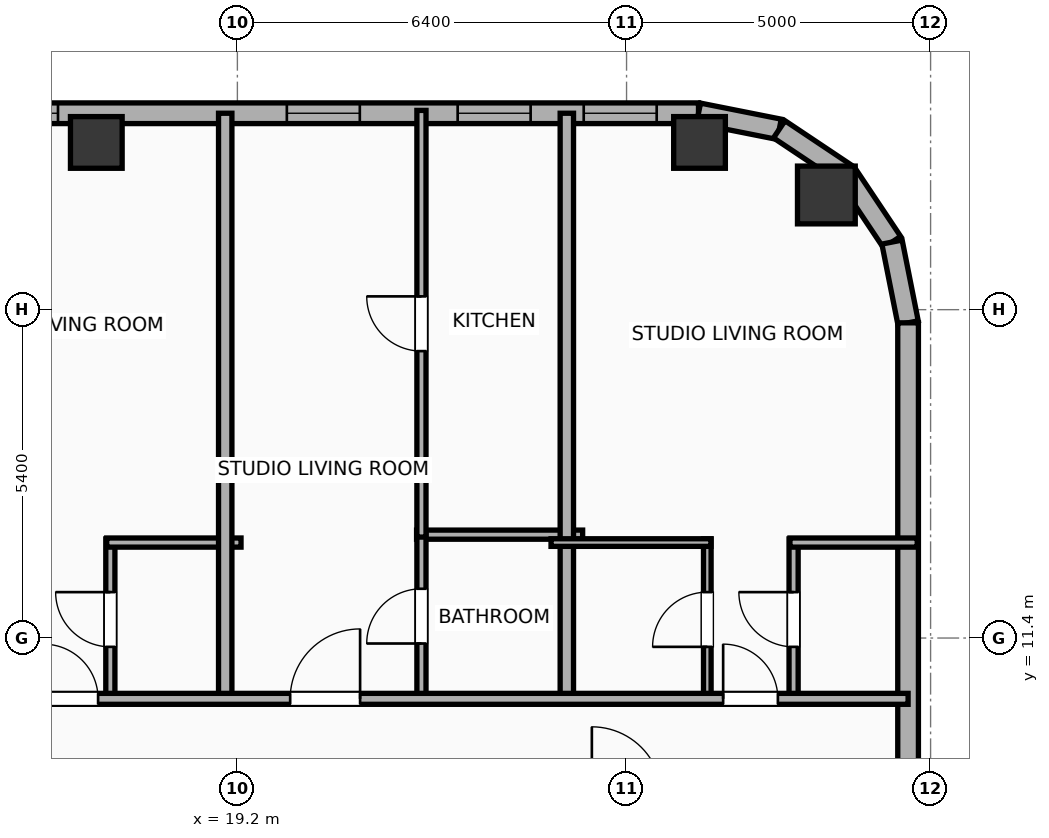
"""IFC4 building model, lengths in metres.
Left out: names, types, materials, properties, quantities, classifications, styles, units other than length and angle.
Written with IfcOpenShell. Run it as: python <this file> out.ifc"""

import sys

from ifc_helpers import new_model, si_unit, direction, frame, frame_2d, origin, origin_2d, place, context, subcontext, project, spatial, rectangle, hollow_rectangle, hollow_circle, extrude, element, fill, save


model = new_model("IFC4")
c1 = context("Model", 3, precision=1e-05, world=origin(), true_north=direction((0.0, 1.0)))
c2 = subcontext(c1, "Body", "Model", "MODEL_VIEW")
j1 = project(units=[si_unit("LENGTHUNIT", "METRE"), si_unit("PLANEANGLEUNIT", "RADIAN")], contexts=[c1])
p1 = place(None, origin())
s1 = spatial("IfcSite", under=j1, at=p1, CompositionType="ELEMENT")
p2 = place(p1, origin())
s2 = spatial("IfcBuilding", under=s1, at=p2, CompositionType="ELEMENT")
p3 = place(p2, frame((0.0, 0.0, 208.0)))
s3 = spatial("IfcBuildingStorey", under=s2, at=p3, CompositionType="ELEMENT", Elevation=208.0)
p4 = place(p3, frame((28.886, 18.686, 0.0), z_axis=(0.0, 0.0, 1.0), x_axis=(1.0, 0.0, 0.0)))
e1 = element("IfcColumn", 1, at=p4, inside=s3, PredefinedType="COLUMN", context=c2, shape_type="SweptSolid", body=[
    extrude(hollow_circle(Radius=0.475, WallThickness=0.032, at=origin_2d()), origin(), (0.0, 0.0, 1.0), 3.9),
])
for number, where, z_axis, x_axis in (
    (2, (26.8, 19.55, 0.0), (0.0, 0.0, 1.0), (1.0, 0.0, 0.0)),
    (3, (16.88, 19.55, 0.0), (0.0, 0.0, 1.0), (1.0, 0.0, 0.0)),
):
    element("IfcColumn", number, at=place(p3, frame(where, z_axis=z_axis, x_axis=x_axis)), inside=s3, PredefinedType="COLUMN", context=c2, shape_type="SweptSolid", body=[
        extrude(hollow_rectangle(XDim=0.85, YDim=0.85, WallThickness=0.028, at=origin_2d()), origin(), (0.0, 0.0, 1.0), 3.9),
    ])
p5 = place(p3, frame((-22.783, 20.03, 0.0), z_axis=(0.0, 0.0, 1.0), x_axis=(1.0, 0.0, 0.0)))
e4 = element("IfcWall", 4, at=p5, inside=s3, PredefinedType="ELEMENTEDWALL", context=c2, shape_type="SweptSolid", body=[
    extrude(rectangle(XDim=49.566, YDim=0.34, at=frame_2d((24.783, 0.0))), origin(), (0.0, 0.0, 1.0), 3.65),
])
p6 = place(p5, frame((25.233, 0.0, 0.75)))
e5 = element("IfcOpeningElement", 5, at=p6, cuts=e4, PredefinedType="OPENING", context=c2, shape_type="SweptSolid", body=[
    extrude(rectangle(XDim=2.4, YDim=2.1, at=frame_2d((1.2, 1.05))), frame((0.0, 0.18, 0.0), z_axis=(0.0, -1.0, 0.0), x_axis=(1.0, 0.0, 0.0)), (0.0, 0.0, 1.0), 0.36),
])
p7 = place(p5, frame((1.532, 0.0, 0.75)))
e6 = element("IfcOpeningElement", 6, at=p7, cuts=e4, PredefinedType="OPENING", context=c2, shape_type="SweptSolid", body=[
    extrude(rectangle(XDim=1.2, YDim=2.05, at=frame_2d((0.6, 1.025))), frame((0.0, 0.18, 0.0), z_axis=(0.0, -1.0, 0.0), x_axis=(1.0, 0.0, 0.0)), (0.0, 0.0, 1.0), 0.36),
])
p8 = place(p5, frame((4.478, 0.0, 0.75)))
e7 = element("IfcOpeningElement", 7, at=p8, cuts=e4, PredefinedType="OPENING", context=c2, shape_type="SweptSolid", body=[
    extrude(rectangle(XDim=1.2, YDim=2.05, at=frame_2d((0.6, 1.025))), frame((0.0, 0.18, 0.0), z_axis=(0.0, -1.0, 0.0), x_axis=(1.0, 0.0, 0.0)), (0.0, 0.0, 1.0), 0.36),
])
p9 = place(p5, frame((7.983, 0.0, 0.75)))
e8 = element("IfcOpeningElement", 8, at=p9, cuts=e4, PredefinedType="OPENING", context=c2, shape_type="SweptSolid", body=[
    extrude(rectangle(XDim=1.2, YDim=2.05, at=frame_2d((0.6, 1.025))), frame((0.0, 0.18, 0.0), z_axis=(0.0, -1.0, 0.0), x_axis=(1.0, 0.0, 0.0)), (0.0, 0.0, 1.0), 0.36),
])
p10 = place(p5, frame((16.46, 0.0, 0.75)))
e9 = element("IfcOpeningElement", 9, at=p10, cuts=e4, PredefinedType="OPENING", context=c2, shape_type="SweptSolid", body=[
    extrude(rectangle(XDim=1.2, YDim=2.05, at=frame_2d((0.6, 1.025))), frame((0.0, 0.18, 0.0), z_axis=(0.0, -1.0, 0.0), x_axis=(1.0, 0.0, 0.0)), (0.0, 0.0, 1.0), 0.36),
])
p11 = place(p5, frame((13.46, 0.0, 0.75)))
e10 = element("IfcOpeningElement", 10, at=p11, cuts=e4, PredefinedType="OPENING", context=c2, shape_type="SweptSolid", body=[
    extrude(rectangle(XDim=1.2, YDim=2.05, at=frame_2d((0.6, 1.025))), frame((0.0, 0.18, 0.0), z_axis=(0.0, -1.0, 0.0), x_axis=(1.0, 0.0, 0.0)), (0.0, 0.0, 1.0), 0.36),
])
p12 = place(p5, frame((21.183, 0.0, 0.75)))
e11 = element("IfcOpeningElement", 11, at=p12, cuts=e4, PredefinedType="OPENING", context=c2, shape_type="SweptSolid", body=[
    extrude(rectangle(XDim=1.2, YDim=2.05, at=frame_2d((0.6, 1.025))), frame((0.0, 0.18, 0.0), z_axis=(0.0, -1.0, 0.0), x_axis=(1.0, 0.0, 0.0)), (0.0, 0.0, 1.0), 0.36),
])
p13 = place(p5, frame((31.808, 0.0, 0.75)))
e12 = element("IfcOpeningElement", 12, at=p13, cuts=e4, PredefinedType="OPENING", context=c2, shape_type="SweptSolid", body=[
    extrude(rectangle(XDim=1.2, YDim=2.05, at=frame_2d((0.6, 1.025))), frame((0.0, 0.18, 0.0), z_axis=(0.0, -1.0, 0.0), x_axis=(1.0, 0.0, 0.0)), (0.0, 0.0, 1.0), 0.36),
])
p14 = place(p5, frame((34.558, 0.0, 0.75)))
e13 = element("IfcOpeningElement", 13, at=p14, cuts=e4, PredefinedType="OPENING", context=c2, shape_type="SweptSolid", body=[
    extrude(rectangle(XDim=1.2, YDim=2.05, at=frame_2d((0.6, 1.025))), frame((0.0, 0.18, 0.0), z_axis=(0.0, -1.0, 0.0), x_axis=(1.0, 0.0, 0.0)), (0.0, 0.0, 1.0), 0.36),
])
p15 = place(p5, frame((37.833, 0.0, 0.75)))
e14 = element("IfcOpeningElement", 14, at=p15, cuts=e4, PredefinedType="OPENING", context=c2, shape_type="SweptSolid", body=[
    extrude(rectangle(XDim=1.2, YDim=2.05, at=frame_2d((0.6, 1.025))), frame((0.0, 0.18, 0.0), z_axis=(0.0, -1.0, 0.0), x_axis=(1.0, 0.0, 0.0)), (0.0, 0.0, 1.0), 0.36),
])
p16 = place(p5, frame((42.797, 0.0, 0.75)))
e15 = element("IfcOpeningElement", 15, at=p16, cuts=e4, PredefinedType="OPENING", context=c2, shape_type="SweptSolid", body=[
    extrude(rectangle(XDim=1.2, YDim=2.05, at=frame_2d((0.6, 1.025))), frame((0.0, 0.18, 0.0), z_axis=(0.0, -1.0, 0.0), x_axis=(1.0, 0.0, 0.0)), (0.0, 0.0, 1.0), 0.36),
])
p17 = place(p5, frame((45.606, 0.0, 0.75)))
e16 = element("IfcOpeningElement", 16, at=p17, cuts=e4, PredefinedType="OPENING", context=c2, shape_type="SweptSolid", body=[
    extrude(rectangle(XDim=1.2, YDim=2.05, at=frame_2d((0.6, 1.025))), frame((0.0, 0.18, 0.0), z_axis=(0.0, -1.0, 0.0), x_axis=(1.0, 0.0, 0.0)), (0.0, 0.0, 1.0), 0.36),
])
p18 = place(p5, frame((47.679, 0.0, 0.75)))
e17 = element("IfcOpeningElement", 17, at=p18, cuts=e4, PredefinedType="OPENING", context=c2, shape_type="SweptSolid", body=[
    extrude(rectangle(XDim=1.2, YDim=2.05, at=frame_2d((0.6, 1.025))), frame((0.0, 0.18, 0.0), z_axis=(0.0, -1.0, 0.0), x_axis=(1.0, 0.0, 0.0)), (0.0, 0.0, 1.0), 0.36),
])
p19 = place(p3, frame((26.783, 20.03, 0.0), z_axis=(0.0, 0.0, 1.0), x_axis=(0.980788153188, -0.195075878998, 0.0)))
e18 = element("IfcWall", 18, at=p19, inside=s3, PredefinedType="ELEMENTEDWALL", context=c2, shape_type="SweptSolid", body=[
    extrude(rectangle(XDim=1.354, YDim=0.34, at=frame_2d((0.677, 0.0))), origin(), (0.0, 0.0, 1.0), 3.65),
])
for number, where, z_axis, x_axis in (
    (19, (28.111, 19.766, 0.0), (0.0, 0.0, 1.0), (0.831, -0.556, 0.0)),
    (20, (29.223, 19.023, 0.0), (0.0, 0.0, 1.0), (0.556, -0.831, 0.0)),
):
    element("IfcWall", number, at=place(p3, frame(where, z_axis=z_axis, x_axis=x_axis)), inside=s3, PredefinedType="ELEMENTEDWALL", context=c2, shape_type="SweptSolid", body=[
        extrude(rectangle(XDim=1.337, YDim=0.34, at=frame_2d((0.668, 0.0))), origin(), (0.0, 0.0, 1.0), 3.65),
    ])
p20 = place(p3, frame((29.966, 17.911, 0.0), z_axis=(0.0, 0.0, 1.0), x_axis=(0.195075878998, -0.980788153188, 0.0)))
e21 = element("IfcWall", 21, at=p20, inside=s3, PredefinedType="ELEMENTEDWALL", context=c2, shape_type="SweptSolid", body=[
    extrude(rectangle(XDim=1.354, YDim=0.34, at=frame_2d((0.677, 0.0))), origin(), (0.0, 0.0, 1.0), 3.65),
])
p21 = place(p3, frame((30.23, 16.583, 0.0), z_axis=(0.0, 0.0, 1.0), x_axis=(0.0, -1.0, 0.0)))
e22 = element("IfcWall", 22, at=p21, inside=s3, PredefinedType="ELEMENTEDWALL", context=c2, shape_type="SweptSolid", body=[
    extrude(rectangle(XDim=31.967, YDim=0.34, at=frame_2d((15.983, 0.0))), origin(), (0.0, 0.0, 1.0), 3.65),
])
p22 = place(p21, frame((29.844, 0.0, 0.75)))
e23 = element("IfcOpeningElement", 23, at=p22, cuts=e22, PredefinedType="OPENING", context=c2, shape_type="SweptSolid", body=[
    extrude(rectangle(XDim=1.2, YDim=2.05, at=frame_2d((0.6, 1.025))), frame((0.0, 0.18, 0.0), z_axis=(0.0, -1.0, 0.0), x_axis=(1.0, 0.0, 0.0)), (0.0, 0.0, 1.0), 0.36),
])
p23 = place(p21, frame((11.488, 0.0, 0.75)))
e24 = element("IfcOpeningElement", 24, at=p23, cuts=e22, PredefinedType="OPENING", context=c2, shape_type="SweptSolid", body=[
    extrude(rectangle(XDim=1.2, YDim=2.05, at=frame_2d((0.6, 1.025))), frame((0.0, 0.18, 0.0), z_axis=(0.0, -1.0, 0.0), x_axis=(1.0, 0.0, 0.0)), (0.0, 0.0, 1.0), 0.36),
])
p24 = place(p21, frame((20.338, 0.0, 0.75)))
e25 = element("IfcOpeningElement", 25, at=p24, cuts=e22, PredefinedType="OPENING", context=c2, shape_type="SweptSolid", body=[
    extrude(rectangle(XDim=1.2, YDim=2.05, at=frame_2d((0.6, 1.025))), frame((0.0, 0.18, 0.0), z_axis=(0.0, -1.0, 0.0), x_axis=(1.0, 0.0, 0.0)), (0.0, 0.0, 1.0), 0.36),
])
p25 = place(p3, frame((17.111, 10.38, 0.0), z_axis=(0.0, 0.0, 1.0), x_axis=(0.0, 1.0, 0.0)))
e26 = element("IfcWall", 26, at=p25, inside=s3, PredefinedType="PLUMBINGWALL", context=c2, shape_type="SweptSolid", body=[
    extrude(rectangle(XDim=2.65, YDim=0.15, at=frame_2d((1.325, 0.0))), origin(), (0.0, 0.0, 1.0), 3.65),
])
p26 = place(p25, frame((0.875, 0.0, 0.0)))
e27 = element("IfcOpeningElement", 27, at=p26, cuts=e26, PredefinedType="OPENING", context=c2, shape_type="SweptSolid", body=[
    extrude(rectangle(XDim=0.9, YDim=2.05, at=frame_2d((0.45, 1.025))), frame((0.0, 0.085, 0.0), z_axis=(0.0, -1.0, 0.0), x_axis=(1.0, 0.0, 0.0)), (0.0, 0.0, 1.0), 0.17),
])
p27 = place(p3, frame((17.051, 12.97, 0.0), z_axis=(0.0, 0.0, 1.0), x_axis=(1.0, 0.0, 0.0)))
e28 = element("IfcWall", 28, at=p27, inside=s3, PredefinedType="PLUMBINGWALL", context=c2, shape_type="SweptSolid", body=[
    extrude(rectangle(XDim=2.209, YDim=0.15, at=frame_2d((1.104, 0.0))), origin(), (0.0, 0.0, 1.0), 3.65),
])
p28 = place(p3, frame((19.0, 10.32, 0.0), z_axis=(0.0, 0.0, 1.0), x_axis=(0.0, 1.0, 0.0)))
e29 = element("IfcWall", 29, at=p28, inside=s3, PredefinedType="PARTITIONING", context=c2, shape_type="SweptSolid", body=[
    extrude(rectangle(XDim=9.71, YDim=0.22, at=frame_2d((4.855, 0.0))), origin(), (0.0, 0.0, 1.0), 3.65),
])
p29 = place(p3, frame((22.147, 13.1, 0.0), z_axis=(0.0, 0.0, 1.0), x_axis=(1.0, 0.0, 0.0)))
e30 = element("IfcWall", 30, at=p29, inside=s3, PredefinedType="PLUMBINGWALL", context=c2, shape_type="SweptSolid", body=[
    extrude(rectangle(XDim=2.731, YDim=0.15, at=frame_2d((1.365, 0.0))), origin(), (0.0, 0.0, 1.0), 3.65),
])
p30 = place(p3, frame((22.227, 10.38, 0.0), z_axis=(0.0, 0.0, 1.0), x_axis=(0.0, 1.0, 0.0)))
e31 = element("IfcWall", 31, at=p30, inside=s3, PredefinedType="PLUMBINGWALL", context=c2, shape_type="SweptSolid", body=[
    extrude(rectangle(XDim=2.76, YDim=0.15, at=frame_2d((1.38, 0.0))), origin(), (0.0, 0.0, 1.0), 3.65),
])
p31 = place(p30, frame((0.93, 0.0, 0.0)))
e32 = element("IfcOpeningElement", 32, at=p31, cuts=e31, PredefinedType="OPENING", context=c2, shape_type="SweptSolid", body=[
    extrude(rectangle(XDim=0.9, YDim=2.05, at=frame_2d((0.45, 1.025))), frame((0.0, 0.085, 0.0), z_axis=(0.0, -1.0, 0.0), x_axis=(1.0, 0.0, 0.0)), (0.0, 0.0, 1.0), 0.17),
])
p32 = place(p3, frame((22.227, 13.06, 0.0), z_axis=(0.0, 0.0, 1.0), x_axis=(0.0, 1.0, 0.0)))
e33 = element("IfcWall", 33, at=p32, inside=s3, PredefinedType="PLUMBINGWALL", context=c2, shape_type="SweptSolid", body=[
    extrude(rectangle(XDim=7.017, YDim=0.15, at=frame_2d((3.508, 0.0))), origin(), (0.0, 0.0, 1.0), 3.65),
])
p33 = place(p32, frame((3.058, 0.0, 0.0)))
e34 = element("IfcOpeningElement", 34, at=p33, cuts=e33, PredefinedType="OPENING", context=c2, shape_type="SweptSolid", body=[
    extrude(rectangle(XDim=0.9, YDim=2.05, at=frame_2d((0.45, 1.025))), frame((0.0, 0.085, 0.0), z_axis=(0.0, -1.0, 0.0), x_axis=(1.0, 0.0, 0.0)), (0.0, 0.0, 1.0), 0.17),
])
p34 = place(p3, frame((24.618, 10.32, 0.0), z_axis=(0.0, 0.0, 1.0), x_axis=(0.0, 1.0, 0.0)))
e35 = element("IfcWall", 35, at=p34, inside=s3, PredefinedType="PARTITIONING", context=c2, shape_type="SweptSolid", body=[
    extrude(rectangle(XDim=9.71, YDim=0.22, at=frame_2d((4.855, 0.0))), origin(), (0.0, 0.0, 1.0), 3.65),
])
p35 = place(p3, frame((26.928, 10.38, 0.0), z_axis=(0.0, 0.0, 1.0), x_axis=(0.0, 1.0, 0.0)))
e36 = element("IfcWall", 36, at=p35, inside=s3, PredefinedType="PARTITIONING", context=c2, shape_type="SweptSolid", body=[
    extrude(rectangle(XDim=2.65, YDim=0.125, at=frame_2d((1.325, 0.0))), origin(), (0.0, 0.0, 1.0), 3.65),
])
p36 = place(p35, frame((0.875, 0.0, 0.0)))
e37 = element("IfcOpeningElement", 37, at=p36, cuts=e36, PredefinedType="OPENING", context=c2, shape_type="SweptSolid", body=[
    extrude(rectangle(XDim=0.9, YDim=2.05, at=frame_2d((0.45, 1.025))), frame((0.0, 0.073, 0.0), z_axis=(0.0, -1.0, 0.0), x_axis=(1.0, 0.0, 0.0)), (0.0, 0.0, 1.0), 0.145),
])
p37 = place(p3, frame((28.347, 10.38, 0.0), z_axis=(0.0, 0.0, 1.0), x_axis=(0.0, 1.0, 0.0)))
e38 = element("IfcWall", 38, at=p37, inside=s3, PredefinedType="PLUMBINGWALL", context=c2, shape_type="SweptSolid", body=[
    extrude(rectangle(XDim=2.65, YDim=0.15, at=frame_2d((1.325, 0.0))), origin(), (0.0, 0.0, 1.0), 3.65),
])
p38 = place(p37, frame((0.875, 0.0, 0.0)))
e39 = element("IfcOpeningElement", 39, at=p38, cuts=e38, PredefinedType="OPENING", context=c2, shape_type="SweptSolid", body=[
    extrude(rectangle(XDim=0.9, YDim=2.05, at=frame_2d((0.45, 1.025))), frame((0.0, 0.085, 0.0), z_axis=(0.0, -1.0, 0.0), x_axis=(1.0, 0.0, 0.0)), (0.0, 0.0, 1.0), 0.17),
])
p39 = place(p3, frame((24.358, 12.97, 0.0), z_axis=(0.0, 0.0, 1.0), x_axis=(1.0, 0.0, 0.0)))
e40 = element("IfcWall", 40, at=p39, inside=s3, PredefinedType="PARTITIONING", context=c2, shape_type="SweptSolid", body=[
    extrude(rectangle(XDim=2.63, YDim=0.125, at=frame_2d((1.315, 0.0))), origin(), (0.0, 0.0, 1.0), 3.65),
])
p40 = place(p3, frame((28.287, 12.97, 0.0), z_axis=(0.0, 0.0, 1.0), x_axis=(1.0, 0.0, 0.0)))
e41 = element("IfcWall", 41, at=p40, inside=s3, PredefinedType="PLUMBINGWALL", context=c2, shape_type="SweptSolid", body=[
    extrude(rectangle(XDim=2.093, YDim=0.15, at=frame_2d((1.046, 0.0))), origin(), (0.0, 0.0, 1.0), 3.65),
])
p41 = place(p3, frame((-26.23, 10.4, 0.0), z_axis=(0.0, 0.0, 1.0), x_axis=(1.0, 0.0, 0.0)))
e42 = element("IfcWall", 42, at=p41, inside=s3, PredefinedType="PARTITIONING", context=c2, shape_type="SweptSolid", body=[
    extrude(rectangle(XDim=56.46, YDim=0.18, at=frame_2d((28.23, 0.0))), origin(), (0.0, 0.0, 1.0), 3.65),
])
p42 = place(p41, frame((4.919, 0.0, 0.0)))
e43 = element("IfcOpeningElement", 43, at=p42, cuts=e42, PredefinedType="OPENING", context=c2, shape_type="SweptSolid", body=[
    extrude(rectangle(XDim=1.15, YDim=2.05, at=frame_2d((0.575, 1.025))), frame((0.0, 0.1, 0.0), z_axis=(0.0, -1.0, 0.0), x_axis=(1.0, 0.0, 0.0)), (0.0, 0.0, 1.0), 0.2),
])
p43 = place(p41, frame((12.903, 0.0, 0.0)))
e44 = element("IfcOpeningElement", 44, at=p43, cuts=e42, PredefinedType="OPENING", context=c2, shape_type="SweptSolid", body=[
    extrude(rectangle(XDim=0.9, YDim=2.05, at=frame_2d((0.45, 1.025))), frame((0.0, 0.1, 0.0), z_axis=(0.0, -1.0, 0.0), x_axis=(1.0, 0.0, 0.0)), (0.0, 0.0, 1.0), 0.2),
])
p44 = place(p41, frame((19.903, 0.0, 0.0)))
e45 = element("IfcOpeningElement", 45, at=p44, cuts=e42, PredefinedType="OPENING", context=c2, shape_type="SweptSolid", body=[
    extrude(rectangle(XDim=1.15, YDim=2.05, at=frame_2d((0.575, 1.025))), frame((0.0, 0.1, 0.0), z_axis=(0.0, -1.0, 0.0), x_axis=(1.0, 0.0, 0.0)), (0.0, 0.0, 1.0), 0.2),
])
p45 = place(p41, frame((24.906, 0.0, 0.0)))
e46 = element("IfcOpeningElement", 46, at=p45, cuts=e42, PredefinedType="OPENING", context=c2, shape_type="SweptSolid", body=[
    extrude(rectangle(XDim=0.9, YDim=2.05, at=frame_2d((0.45, 1.025))), frame((0.0, 0.1, 0.0), z_axis=(0.0, -1.0, 0.0), x_axis=(1.0, 0.0, 0.0)), (0.0, 0.0, 1.0), 0.2),
])
p46 = place(p41, frame((30.908, 0.0, 0.0)))
e47 = element("IfcOpeningElement", 47, at=p46, cuts=e42, PredefinedType="OPENING", context=c2, shape_type="SweptSolid", body=[
    extrude(rectangle(XDim=0.9, YDim=2.05, at=frame_2d((0.45, 1.025))), frame((0.0, 0.1, 0.0), z_axis=(0.0, -1.0, 0.0), x_axis=(1.0, 0.0, 0.0)), (0.0, 0.0, 1.0), 0.2),
])
p47 = place(p41, frame((35.311, 0.0, 0.0)))
e48 = element("IfcOpeningElement", 48, at=p47, cuts=e42, PredefinedType="OPENING", context=c2, shape_type="SweptSolid", body=[
    extrude(rectangle(XDim=1.15, YDim=2.05, at=frame_2d((0.575, 1.025))), frame((0.0, 0.1, 0.0), z_axis=(0.0, -1.0, 0.0), x_axis=(1.0, 0.0, 0.0)), (0.0, 0.0, 1.0), 0.2),
])
p48 = place(p41, frame((42.24, 0.0, 0.0)))
e49 = element("IfcOpeningElement", 49, at=p48, cuts=e42, PredefinedType="OPENING", context=c2, shape_type="SweptSolid", body=[
    extrude(rectangle(XDim=0.9, YDim=2.05, at=frame_2d((0.45, 1.025))), frame((0.0, 0.1, 0.0), z_axis=(0.0, -1.0, 0.0), x_axis=(1.0, 0.0, 0.0)), (0.0, 0.0, 1.0), 0.2),
])
p49 = place(p41, frame((46.298, 0.0, 0.0)))
e50 = element("IfcOpeningElement", 50, at=p49, cuts=e42, PredefinedType="OPENING", context=c2, shape_type="SweptSolid", body=[
    extrude(rectangle(XDim=1.15, YDim=2.05, at=frame_2d((0.575, 1.025))), frame((0.0, 0.1, 0.0), z_axis=(0.0, -1.0, 0.0), x_axis=(1.0, 0.0, 0.0)), (0.0, 0.0, 1.0), 0.2),
])
p50 = place(p41, frame((53.418, 0.0, 0.0)))
e51 = element("IfcOpeningElement", 51, at=p50, cuts=e42, PredefinedType="OPENING", context=c2, shape_type="SweptSolid", body=[
    extrude(rectangle(XDim=0.9, YDim=2.05, at=frame_2d((0.45, 1.025))), frame((0.0, 0.1, 0.0), z_axis=(0.0, -1.0, 0.0), x_axis=(1.0, 0.0, 0.0)), (0.0, 0.0, 1.0), 0.2),
])
p51 = place(p15, origin())
e52 = element("IfcWindow", 52, at=p51, inside=s3, PartitioningType="SINGLE_PANEL", PredefinedType="WINDOW", context=c2, shape_type="SweptSolid", body=[
    extrude(rectangle(XDim=1.2, YDim=2.05, at=frame_2d((0.6, 1.025))), frame((0.0, 0.03, 0.0), z_axis=(0.0, -1.0, 0.0), x_axis=(1.0, 0.0, 0.0)), (0.0, 0.0, 1.0), 0.06),
])
fill(e14, e52)
p52 = place(p16, origin())
e53 = element("IfcWindow", 53, at=p52, inside=s3, PartitioningType="SINGLE_PANEL", PredefinedType="WINDOW", context=c2, shape_type="SweptSolid", body=[
    extrude(rectangle(XDim=1.2, YDim=2.05, at=frame_2d((0.6, 1.025))), frame((0.0, 0.03, 0.0), z_axis=(0.0, -1.0, 0.0), x_axis=(1.0, 0.0, 0.0)), (0.0, 0.0, 1.0), 0.06),
])
fill(e15, e53)
p53 = place(p17, origin())
e54 = element("IfcWindow", 54, at=p53, inside=s3, PartitioningType="SINGLE_PANEL", PredefinedType="WINDOW", context=c2, shape_type="SweptSolid", body=[
    extrude(rectangle(XDim=1.2, YDim=2.05, at=frame_2d((0.6, 1.025))), frame((0.0, 0.03, 0.0), z_axis=(0.0, -1.0, 0.0), x_axis=(1.0, 0.0, 0.0)), (0.0, 0.0, 1.0), 0.06),
])
fill(e16, e54)
p54 = place(p18, origin())
e55 = element("IfcWindow", 55, at=p54, inside=s3, PartitioningType="SINGLE_PANEL", PredefinedType="WINDOW", context=c2, shape_type="SweptSolid", body=[
    extrude(rectangle(XDim=1.2, YDim=2.05, at=frame_2d((0.6, 1.025))), frame((0.0, 0.03, 0.0), z_axis=(0.0, -1.0, 0.0), x_axis=(1.0, 0.0, 0.0)), (0.0, 0.0, 1.0), 0.06),
])
fill(e17, e55)
p55 = place(p26, origin())
e56 = element("IfcDoor", 56, at=p55, inside=s3, OperationType="SINGLE_SWING_RIGHT", PredefinedType="DOOR", context=c2, shape_type="SweptSolid", body=[
    extrude(rectangle(XDim=0.9, YDim=2.05, at=frame_2d((0.45, 1.025))), frame((0.0, 0.025, 0.0), z_axis=(0.0, -1.0, 0.0), x_axis=(1.0, 0.0, 0.0)), (0.0, 0.0, 1.0), 0.05),
])
fill(e27, e56)
p56 = place(p31, origin())
e57 = element("IfcDoor", 57, at=p56, inside=s3, OperationType="SINGLE_SWING_LEFT", PredefinedType="DOOR", context=c2, shape_type="SweptSolid", body=[
    extrude(rectangle(XDim=0.9, YDim=2.05, at=frame_2d((0.45, 1.025))), frame((0.0, 0.025, 0.0), z_axis=(0.0, -1.0, 0.0), x_axis=(1.0, 0.0, 0.0)), (0.0, 0.0, 1.0), 0.05),
])
fill(e32, e57)
p57 = place(p33, origin())
e58 = element("IfcDoor", 58, at=p57, inside=s3, OperationType="SINGLE_SWING_RIGHT", PredefinedType="DOOR", context=c2, shape_type="SweptSolid", body=[
    extrude(rectangle(XDim=0.9, YDim=2.05, at=frame_2d((0.45, 1.025))), frame((0.0, 0.025, 0.0), z_axis=(0.0, -1.0, 0.0), x_axis=(1.0, 0.0, 0.0)), (0.0, 0.0, 1.0), 0.05),
])
fill(e34, e58)
p58 = place(p36, origin())
e59 = element("IfcDoor", 59, at=p58, inside=s3, OperationType="SINGLE_SWING_LEFT", PredefinedType="DOOR", context=c2, shape_type="SweptSolid", body=[
    extrude(rectangle(XDim=0.9, YDim=2.05, at=frame_2d((0.45, 1.025))), frame((0.0, 0.025, 0.0), z_axis=(0.0, -1.0, 0.0), x_axis=(1.0, 0.0, 0.0)), (0.0, 0.0, 1.0), 0.05),
])
fill(e37, e59)
p59 = place(p38, origin())
e60 = element("IfcDoor", 60, at=p59, inside=s3, OperationType="SINGLE_SWING_RIGHT", PredefinedType="DOOR", context=c2, shape_type="SweptSolid", body=[
    extrude(rectangle(XDim=0.9, YDim=2.05, at=frame_2d((0.45, 1.025))), frame((0.0, 0.025, 0.0), z_axis=(0.0, -1.0, 0.0), x_axis=(1.0, 0.0, 0.0)), (0.0, 0.0, 1.0), 0.05),
])
fill(e39, e60)
p60 = place(p48, origin())
e61 = element("IfcDoor", 61, at=p60, inside=s3, OperationType="SINGLE_SWING_LEFT", PredefinedType="DOOR", context=c2, shape_type="SweptSolid", body=[
    extrude(rectangle(XDim=0.9, YDim=2.05, at=frame_2d((0.45, 1.025))), frame((0.0, 0.025, 0.0), z_axis=(0.0, -1.0, 0.0), x_axis=(1.0, 0.0, 0.0)), (0.0, 0.0, 1.0), 0.05),
])
fill(e49, e61)
p61 = place(p49, origin())
e62 = element("IfcDoor", 62, at=p61, inside=s3, OperationType="SINGLE_SWING_RIGHT", PredefinedType="DOOR", context=c2, shape_type="SweptSolid", body=[
    extrude(rectangle(XDim=1.15, YDim=2.05, at=frame_2d((0.575, 1.025))), frame((0.0, 0.025, 0.0), z_axis=(0.0, -1.0, 0.0), x_axis=(1.0, 0.0, 0.0)), (0.0, 0.0, 1.0), 0.05),
])
fill(e50, e62)
p62 = place(p50, origin())
e63 = element("IfcDoor", 63, at=p62, inside=s3, OperationType="SINGLE_SWING_LEFT", PredefinedType="DOOR", context=c2, shape_type="SweptSolid", body=[
    extrude(rectangle(XDim=0.9, YDim=2.05, at=frame_2d((0.45, 1.025))), frame((0.0, 0.025, 0.0), z_axis=(0.0, -1.0, 0.0), x_axis=(1.0, 0.0, 0.0)), (0.0, 0.0, 1.0), 0.05),
])
fill(e51, e63)
save(model, sys.argv[1])
